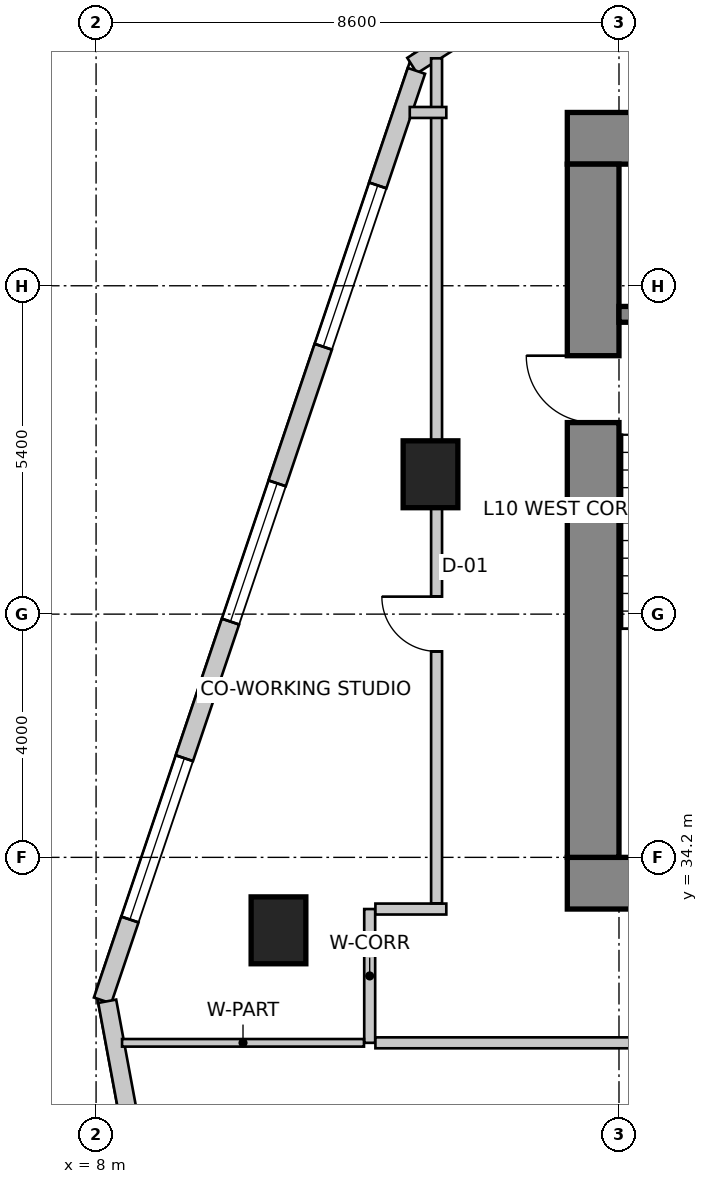
"""IFC4 building model, lengths in metres.
Left out: names, types, materials, properties, quantities, classifications, styles, units other than length and angle.
Written with IfcOpenShell. Run it as: python <this file> out.ifc"""

import sys

from ifc_helpers import new_model, si_unit, direction, frame, frame_2d, origin, origin_2d, place, context, subcontext, project, spatial, rectangle, extrude, source, transform, mapped, element, fill, save


model = new_model("IFC4")
c1 = context("Model", 3, precision=1e-05, world=origin(), true_north=direction((0.0, 1.0)))
c2 = subcontext(c1, "Body", "Model", "MODEL_VIEW")
j1 = project(units=[si_unit("LENGTHUNIT", "METRE"), si_unit("PLANEANGLEUNIT", "RADIAN")], contexts=[c1])
p1 = place(None, origin())
s1 = spatial("IfcSite", under=j1, at=p1, CompositionType="ELEMENT")
p2 = place(p1, origin())
s2 = spatial("IfcBuilding", under=s1, at=p2, CompositionType="ELEMENT")
p3 = place(p2, frame((0.0, 0.0, 43.0)))
s3 = spatial("IfcBuildingStorey", under=s2, at=p3, CompositionType="ELEMENT", Elevation=43.0)
p4 = place(p3, frame((15.75, 46.025, 0.0), z_axis=(0.0, 0.0, 1.0), x_axis=(1.0, 0.0, 0.0)))
e1 = element("IfcWall", 1, at=p4, inside=s3, PredefinedType="SHEAR", context=c2, shape_type="SweptSolid", body=[
    extrude(rectangle(XDim=16.1, YDim=0.85, at=frame_2d((8.05, 0.0))), origin(), (0.0, 0.0, 1.0), 4.0),
])
p5 = place(p3, frame((15.75, 33.775, 0.0), z_axis=(0.0, 0.0, 1.0), x_axis=(1.0, 0.0, 0.0)))
e2 = element("IfcWall", 2, at=p5, inside=s3, PredefinedType="SHEAR", context=c2, shape_type="SweptSolid", body=[
    extrude(rectangle(XDim=16.1, YDim=0.85, at=frame_2d((8.05, 0.0))), origin(), (0.0, 0.0, 1.0), 4.0),
])
m1 = source(origin(), c2, "Body", "SweptSolid", [
    extrude(rectangle(XDim=1.3, YDim=2.15, at=frame_2d((0.65, 1.075))), frame((0.0, 0.435, 0.0), z_axis=(0.0, -1.0, 0.0), x_axis=(1.0, 0.0, 0.0)), (0.0, 0.0, 1.0), 0.87),
])
p6 = place(p5, frame((10.18, 0.0, 0.0)))
e3 = element("IfcOpeningElement", 3, at=p6, cuts=e2, PredefinedType="OPENING", context=c2, shape_type="MappedRepresentation", body=[
    mapped(m1, transform((0.0, 0.0, 0.0), scale=1.0)),
])
p7 = place(p3, frame((16.175, 34.2, 0.0), z_axis=(0.0, 0.0, 1.0), x_axis=(0.0, 1.0, 0.0)))
e4 = element("IfcWall", 4, at=p7, inside=s3, PredefinedType="SHEAR", context=c2, shape_type="SweptSolid", body=[
    extrude(rectangle(XDim=11.4, YDim=0.85, at=frame_2d((5.7, 0.0))), origin(), (0.0, 0.0, 1.0), 4.0),
])
m2 = source(origin(), c2, "Body", "SweptSolid", [
    extrude(rectangle(XDim=1.1, YDim=2.15, at=frame_2d((0.55, 1.075))), frame((0.0, 0.435, 0.0), z_axis=(0.0, -1.0, 0.0), x_axis=(1.0, 0.0, 0.0)), (0.0, 0.0, 1.0), 0.87),
])
p8 = place(p7, frame((7.15, 0.0, 0.0)))
e5 = element("IfcOpeningElement", 5, at=p8, cuts=e4, PredefinedType="OPENING", context=c2, shape_type="MappedRepresentation", body=[
    mapped(m2, transform((0.0, 0.0, 0.0), scale=1.0)),
])
p9 = place(p3, frame((16.6, 43.13, 0.0), z_axis=(0.0, 0.0, 1.0), x_axis=(1.0, 0.0, 0.0)))
e6 = element("IfcWall", 6, at=p9, inside=s3, PredefinedType="SHEAR", context=c2, shape_type="SweptSolid", body=[
    extrude(rectangle(XDim=3.5, YDim=0.26, at=frame_2d((1.75, 0.0))), origin(), (0.0, 0.0, 1.0), 4.0),
])
m3 = source(origin(), c2, "Body", "SweptSolid", [
    extrude(rectangle(XDim=0.9, YDim=1.1, at=origin_2d()), origin(), (0.0, 0.0, 1.0), 4.0),
])
for number, where, z_axis, x_axis in (
    (7, (11.0, 33.0, 0.0), (0.0, 0.0, 1.0), (1.0, 0.0, 0.0)),
    (8, (13.5, 40.5, 0.0), (0.0, 0.0, 1.0), (1.0, 0.0, 0.0)),
):
    element("IfcColumn", number, at=place(p3, frame(where, z_axis=z_axis, x_axis=x_axis)), inside=s3, PredefinedType="COLUMN", context=c2, shape_type="MappedRepresentation", body=[
        mapped(m3, transform((0.0, 0.0, 0.0), scale=1.0)),
    ])
p10 = place(p3, frame((21.875, 52.743, 0.0), z_axis=(0.0, 0.0, 1.0), x_axis=(-0.843647802826, -0.536896996441, 0.0)))
e9 = element("IfcWall", 9, at=p10, inside=s3, PredefinedType="SOLIDWALL", context=c2, shape_type="SweptSolid", body=[
    extrude(rectangle(XDim=10.284, YDim=0.3, at=frame_2d((5.142, 0.0))), origin(), (0.0, 0.0, 1.0), 3.75),
])
m4 = source(origin(), c2, "Body", "SweptSolid", [
    extrude(rectangle(XDim=0.9, YDim=1.6, at=frame_2d((0.45, 0.8))), frame((0.0, 0.16, 0.0), z_axis=(0.0, -1.0, 0.0), x_axis=(1.0, 0.0, 0.0)), (0.0, 0.0, 1.0), 0.32),
])
p11 = place(p10, frame((0.629, 0.0, 0.85)))
e10 = element("IfcOpeningElement", 10, at=p11, cuts=e9, PredefinedType="OPENING", context=c2, shape_type="MappedRepresentation", body=[
    mapped(m4, transform((0.0, 0.0, 0.0), scale=1.0)),
])
m5 = source(origin(), c2, "Body", "SweptSolid", [
    extrude(rectangle(XDim=2.4, YDim=2.2, at=frame_2d((1.2, 1.1))), frame((0.0, 0.16, 0.0), z_axis=(0.0, -1.0, 0.0), x_axis=(1.0, 0.0, 0.0)), (0.0, 0.0, 1.0), 0.32),
])
p12 = place(p10, frame((3.542, 0.0, 0.85)))
e11 = element("IfcOpeningElement", 11, at=p12, cuts=e9, PredefinedType="OPENING", context=c2, shape_type="MappedRepresentation", body=[
    mapped(m5, transform((0.0, 0.0, 0.0), scale=1.0)),
])
m6 = source(origin(), c2, "Body", "SweptSolid", [
    extrude(rectangle(XDim=1.5, YDim=1.8, at=frame_2d((0.75, 0.9))), frame((0.0, 0.16, 0.0), z_axis=(0.0, -1.0, 0.0), x_axis=(1.0, 0.0, 0.0)), (0.0, 0.0, 1.0), 0.32),
])
p13 = place(p10, frame((7.904, 0.0, 0.85)))
e12 = element("IfcOpeningElement", 12, at=p13, cuts=e9, PredefinedType="OPENING", context=c2, shape_type="MappedRepresentation", body=[
    mapped(m6, transform((0.0, 0.0, 0.0), scale=1.0)),
])
p14 = place(p3, frame((13.269, 47.134, 0.0), z_axis=(0.0, 0.0, 1.0), x_axis=(-0.319920423265, -0.947444416722, 0.0)))
e13 = element("IfcWall", 13, at=p14, inside=s3, PredefinedType="SOLIDWALL", context=c2, shape_type="SweptSolid", body=[
    extrude(rectangle(XDim=16.135, YDim=0.3, at=frame_2d((8.067, 0.0))), origin(), (0.0, 0.0, 1.0), 3.75),
])
m7 = source(origin(), c2, "Body", "SweptSolid", [
    extrude(rectangle(XDim=2.8, YDim=2.4, at=frame_2d((1.4, 1.2))), frame((0.0, 0.16, 0.0), z_axis=(0.0, -1.0, 0.0), x_axis=(1.0, 0.0, 0.0)), (0.0, 0.0, 1.0), 0.32),
])
p15 = place(p14, frame((1.988, 0.0, 0.85)))
e14 = element("IfcOpeningElement", 14, at=p15, cuts=e13, PredefinedType="OPENING", context=c2, shape_type="MappedRepresentation", body=[
    mapped(m7, transform((0.0, 0.0, 0.0), scale=1.0)),
])
p16 = place(p14, frame((7.159, 0.0, 0.85)))
e15 = element("IfcOpeningElement", 15, at=p16, cuts=e13, PredefinedType="OPENING", context=c2, shape_type="MappedRepresentation", body=[
    mapped(m5, transform((0.0, 0.0, 0.0), scale=1.0)),
])
p17 = place(p14, frame((11.93, 0.0, 0.85)))
e16 = element("IfcOpeningElement", 16, at=p17, cuts=e13, PredefinedType="OPENING", context=c2, shape_type="MappedRepresentation", body=[
    mapped(m7, transform((0.0, 0.0, 0.0), scale=1.0)),
])
p18 = place(p3, frame((8.183, 31.833, 0.0), z_axis=(0.0, 0.0, 1.0), x_axis=(0.18216364648, -0.983268226834, 0.0)))
e17 = element("IfcWall", 17, at=p18, inside=s3, PredefinedType="SOLIDWALL", context=c2, shape_type="SweptSolid", body=[
    extrude(rectangle(XDim=26.678, YDim=0.3, at=frame_2d((13.339, 0.0))), origin(), (0.0, 0.0, 1.0), 3.75),
])
p19 = place(p18, frame((3.152, 0.0, 0.85)))
e18 = element("IfcOpeningElement", 18, at=p19, cuts=e17, PredefinedType="OPENING", context=c2, shape_type="MappedRepresentation", body=[
    mapped(m5, transform((0.0, 0.0, 0.0), scale=1.0)),
])
p20 = place(p18, frame((9.186, 0.0, 0.85)))
e19 = element("IfcOpeningElement", 19, at=p20, cuts=e17, PredefinedType="OPENING", context=c2, shape_type="MappedRepresentation", body=[
    mapped(m5, transform((0.0, 0.0, 0.0), scale=1.0)),
])
p21 = place(p18, frame((13.343, 0.0, 0.85)))
e20 = element("IfcOpeningElement", 20, at=p21, cuts=e17, PredefinedType="OPENING", context=c2, shape_type="MappedRepresentation", body=[
    mapped(m7, transform((0.0, 0.0, 0.0), scale=1.0)),
])
p22 = place(p18, frame((18.411, 0.0, 0.85)))
e21 = element("IfcOpeningElement", 21, at=p22, cuts=e17, PredefinedType="OPENING", context=c2, shape_type="MappedRepresentation", body=[
    mapped(m5, transform((0.0, 0.0, 0.0), scale=1.0)),
])
p23 = place(p18, frame((22.709, 0.0, 0.85)))
e22 = element("IfcOpeningElement", 22, at=p23, cuts=e17, PredefinedType="OPENING", context=c2, shape_type="MappedRepresentation", body=[
    mapped(m7, transform((0.0, 0.0, 0.0), scale=1.0)),
])
p24 = place(p3, frame((12.5, 31.15, 0.0), z_axis=(0.0, 0.0, 1.0), x_axis=(0.0, 1.0, 0.0)))
e23 = element("IfcWall", 23, at=p24, inside=s3, PredefinedType="PARTITIONING", context=c2, shape_type="SweptSolid", body=[
    extrude(rectangle(XDim=2.2, YDim=0.18, at=frame_2d((1.1, 0.0))), origin(), (0.0, 0.0, 1.0), 3.419),
])
p25 = place(p3, frame((12.594, 33.35, 0.0), z_axis=(0.0, 0.0, 1.0), x_axis=(1.0, 0.0, 0.0)))
e24 = element("IfcWall", 24, at=p25, inside=s3, PredefinedType="PARTITIONING", context=c2, shape_type="SweptSolid", body=[
    extrude(rectangle(XDim=1.166, YDim=0.18, at=frame_2d((0.583, 0.0))), origin(), (0.0, 0.0, 1.0), 3.75),
])
p26 = place(p3, frame((17.96, 31.15, 0.0), z_axis=(0.0, 0.0, 1.0), x_axis=(-1.0, 0.0, 0.0)))
e25 = element("IfcWall", 25, at=p26, inside=s3, PredefinedType="PARTITIONING", context=c2, shape_type="SweptSolid", body=[
    extrude(rectangle(XDim=5.366, YDim=0.18, at=frame_2d((2.683, 0.0))), origin(), (0.0, 0.0, 1.0), 3.419),
])
p27 = place(p3, frame((13.6, 33.444, 0.0), z_axis=(0.0, 0.0, 1.0), x_axis=(0.0, 1.0, 0.0)))
e26 = element("IfcWall", 26, at=p27, inside=s3, PredefinedType="PARTITIONING", context=c2, shape_type="SweptSolid", body=[
    extrude(rectangle(XDim=13.896, YDim=0.18, at=frame_2d((6.948, 0.0))), origin(), (0.0, 0.0, 1.0), 2.892),
])
m8 = source(origin(), c2, "Body", "SweptSolid", [
    extrude(rectangle(XDim=0.9, YDim=2.15, at=frame_2d((0.45, 1.075))), frame((0.0, 0.1, 0.0), z_axis=(0.0, -1.0, 0.0), x_axis=(1.0, 0.0, 0.0)), (0.0, 0.0, 1.0), 0.2),
])
p28 = place(p27, frame((4.144, 0.0, 0.0)))
e27 = element("IfcOpeningElement", 27, at=p28, cuts=e26, PredefinedType="OPENING", context=c2, shape_type="MappedRepresentation", body=[
    mapped(m8, transform((0.0, 0.0, 0.0), scale=1.0)),
])
p29 = place(p3, frame((13.76, 46.45, 0.0), z_axis=(0.0, 0.0, 1.0), x_axis=(-1.0, 0.0, 0.0)))
e28 = element("IfcWall", 28, at=p29, inside=s3, PredefinedType="PARTITIONING", context=c2, shape_type="SweptSolid", body=[
    extrude(rectangle(XDim=0.601, YDim=0.18, at=frame_2d((0.301, 0.0))), origin(), (0.0, 0.0, 1.0), 3.75),
])
p30 = place(p3, frame((12.406, 31.15, 0.0), z_axis=(0.0, 0.0, 1.0), x_axis=(-1.0, 0.0, 0.0)))
e29 = element("IfcWall", 29, at=p30, inside=s3, PredefinedType="PARTITIONING", context=c2, shape_type="SweptSolid", body=[
    extrude(rectangle(XDim=3.979, YDim=0.125, at=frame_2d((1.99, 0.0))), origin(), (0.0, 0.0, 1.0), 2.892),
])
m9 = source(origin(), c2, "Body", "SweptSolid", [
    extrude(rectangle(XDim=2.8, YDim=2.4, at=frame_2d((1.4, 1.2))), frame((0.0, -0.015, 0.0), z_axis=(0.0, -1.0, 0.0), x_axis=(1.0, 0.0, 0.0)), (0.0, 0.0, 1.0), 0.06),
])
p31 = place(p15, origin())
e30 = element("IfcWindow", 30, at=p31, inside=s3, PartitioningType="SINGLE_PANEL", PredefinedType="WINDOW", context=c2, shape_type="MappedRepresentation", body=[
    mapped(m9, transform((0.0, 0.0, 0.0), scale=1.0)),
])
fill(e14, e30)
m10 = source(origin(), c2, "Body", "SweptSolid", [
    extrude(rectangle(XDim=2.4, YDim=2.2, at=frame_2d((1.2, 1.1))), frame((0.0, -0.015, 0.0), z_axis=(0.0, -1.0, 0.0), x_axis=(1.0, 0.0, 0.0)), (0.0, 0.0, 1.0), 0.06),
])
p32 = place(p16, origin())
e31 = element("IfcWindow", 31, at=p32, inside=s3, PartitioningType="SINGLE_PANEL", PredefinedType="WINDOW", context=c2, shape_type="MappedRepresentation", body=[
    mapped(m10, transform((0.0, 0.0, 0.0), scale=1.0)),
])
fill(e15, e31)
p33 = place(p17, origin())
e32 = element("IfcWindow", 32, at=p33, inside=s3, PartitioningType="SINGLE_PANEL", PredefinedType="WINDOW", context=c2, shape_type="MappedRepresentation", body=[
    mapped(m9, transform((0.0, 0.0, 0.0), scale=1.0)),
])
fill(e16, e32)
m11 = source(origin(), c2, "Body", "SweptSolid", [
    extrude(rectangle(XDim=1.1, YDim=2.15, at=frame_2d((0.55, 1.075))), frame((0.0, 0.025, 0.0), z_axis=(0.0, -1.0, 0.0), x_axis=(1.0, 0.0, 0.0)), (0.0, 0.0, 1.0), 0.05),
])
p34 = place(p8, origin())
e33 = element("IfcDoor", 33, at=p34, inside=s3, OperationType="SINGLE_SWING_RIGHT", PredefinedType="DOOR", context=c2, shape_type="MappedRepresentation", body=[
    mapped(m11, transform((0.0, 0.0, 0.0), scale=1.0)),
])
fill(e5, e33)
m12 = source(origin(), c2, "Body", "SweptSolid", [
    extrude(rectangle(XDim=0.9, YDim=2.15, at=frame_2d((0.45, 1.075))), frame((0.0, 0.025, 0.0), z_axis=(0.0, -1.0, 0.0), x_axis=(1.0, 0.0, 0.0)), (0.0, 0.0, 1.0), 0.05),
])
p35 = place(p28, origin())
e34 = element("IfcDoor", 34, at=p35, inside=s3, OperationType="SINGLE_SWING_RIGHT", PredefinedType="DOOR", context=c2, shape_type="MappedRepresentation", body=[
    mapped(m12, transform((0.0, 0.0, 0.0), scale=1.0)),
])
fill(e27, e34)
save(model, sys.argv[1])
